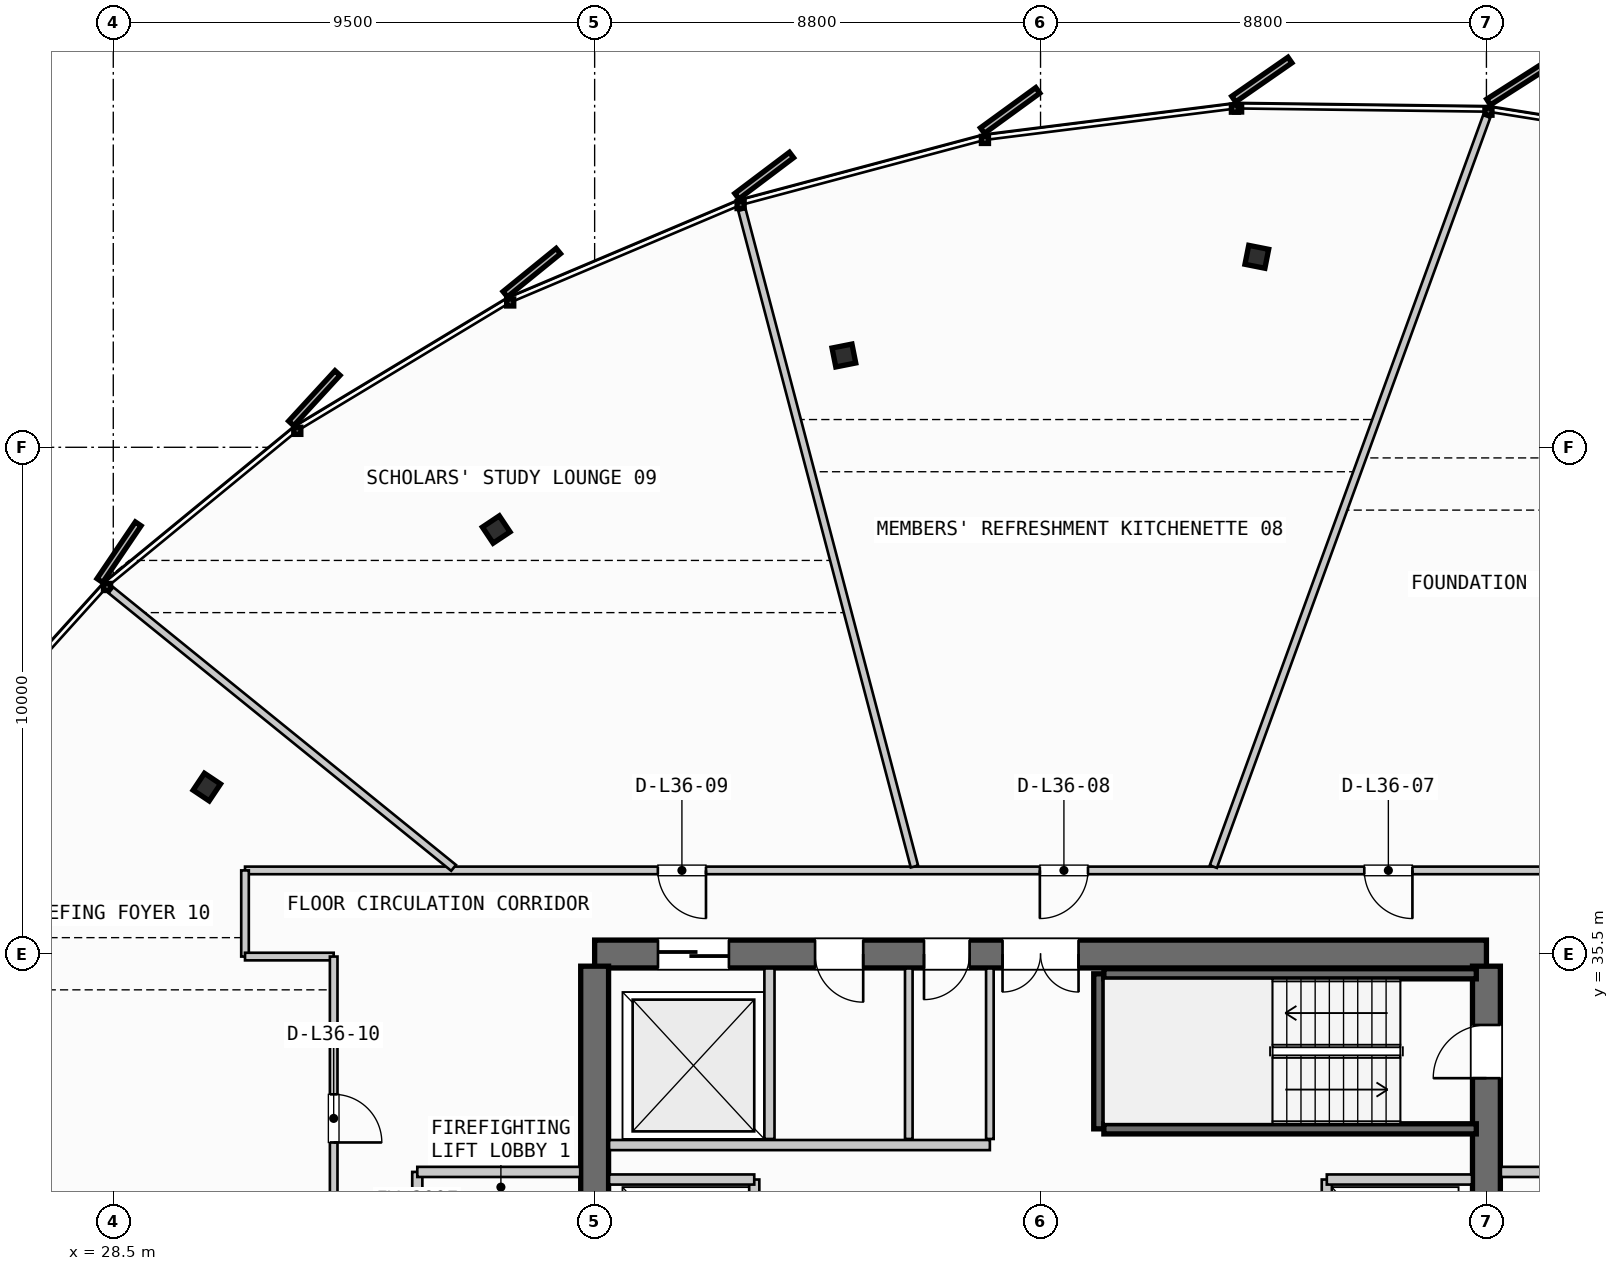
"""IFC4 building model, lengths in metres.
Left out: names, types, materials, properties, quantities, classifications, styles, units other than length and angle.
Written with IfcOpenShell. Run it as: python <this file> out.ifc"""

import sys

from ifc_helpers import new_model, si_unit, direction, frame, frame_2d, origin, origin_2d, place, context, subcontext, project, spatial, rectangle, i_section, extrude, source, transform, mapped, element, fill, save


model = new_model("IFC4")
c1 = context("Model", 3, precision=1e-05, world=origin(), true_north=direction((0.0, 1.0)))
c2 = subcontext(c1, "Body", "Model", "MODEL_VIEW")
j1 = project(units=[si_unit("LENGTHUNIT", "METRE"), si_unit("PLANEANGLEUNIT", "RADIAN")], contexts=[c1])
p1 = place(None, origin())
s1 = spatial("IfcSite", under=j1, at=p1, CompositionType="ELEMENT")
p2 = place(p1, origin())
s2 = spatial("IfcBuilding", under=s1, at=p2, CompositionType="ELEMENT")
p3 = place(p2, frame((0.0, 0.0, 143.0)))
s3 = spatial("IfcBuildingStorey", under=s2, at=p3, CompositionType="ELEMENT", Elevation=143.0)
p4 = place(p3, frame((55.6, 35.5, 0.0), z_axis=(0.0, 0.0, 1.0), x_axis=(-1.0, 0.0, 0.0)))
e1 = element("IfcWall", 1, at=p4, inside=s3, PredefinedType="SHEAR", context=c2, shape_type="SweptSolid", body=[
    extrude(rectangle(XDim=17.6, YDim=0.55, at=frame_2d((8.8, 0.0))), origin(), (0.0, 0.0, 1.0), 3.3),
])
p5 = place(p4, frame((8.05, 0.0, 0.0)))
e2 = element("IfcOpeningElement", 2, at=p5, cuts=e1, PredefinedType="OPENING", context=c2, shape_type="SweptSolid", body=[
    extrude(rectangle(XDim=1.5, YDim=2.2, at=frame_2d((0.75, 1.1))), frame((0.0, 0.285, 0.0), z_axis=(0.0, -1.0, 0.0), x_axis=(1.0, 0.0, 0.0)), (0.0, 0.0, 1.0), 0.57),
])
p6 = place(p4, frame((14.95, 0.0, 0.0)))
e3 = element("IfcOpeningElement", 3, at=p6, cuts=e1, PredefinedType="OPENING", context=c2, shape_type="SweptSolid", body=[
    extrude(rectangle(XDim=1.4, YDim=2.3, at=frame_2d((0.7, 1.15))), frame((0.0, 0.285, 0.0), z_axis=(0.0, -1.0, 0.0), x_axis=(1.0, 0.0, 0.0)), (0.0, 0.0, 1.0), 0.57),
])
p7 = place(p4, frame((12.3, 0.0, 0.0)))
e4 = element("IfcOpeningElement", 4, at=p7, cuts=e1, PredefinedType="OPENING", context=c2, shape_type="SweptSolid", body=[
    extrude(rectangle(XDim=0.95, YDim=2.15, at=frame_2d((0.475, 1.075))), frame((0.0, 0.285, 0.0), z_axis=(0.0, -1.0, 0.0), x_axis=(1.0, 0.0, 0.0)), (0.0, 0.0, 1.0), 0.57),
])
p8 = place(p4, frame((10.2, 0.0, 0.0)))
e5 = element("IfcOpeningElement", 5, at=p8, cuts=e1, PredefinedType="OPENING", context=c2, shape_type="SweptSolid", body=[
    extrude(rectangle(XDim=0.9, YDim=2.15, at=frame_2d((0.45, 1.075))), frame((0.0, 0.285, 0.0), z_axis=(0.0, -1.0, 0.0), x_axis=(1.0, 0.0, 0.0)), (0.0, 0.0, 1.0), 0.57),
])
p9 = place(p3, frame((38.0, 35.26, 0.0), z_axis=(0.0, 0.0, 1.0), x_axis=(0.0, -1.0, 0.0)))
e6 = element("IfcWall", 6, at=p9, inside=s3, PredefinedType="SHEAR", context=c2, shape_type="SweptSolid", body=[
    extrude(rectangle(XDim=14.92, YDim=0.55, at=frame_2d((7.46, 0.0))), origin(), (0.0, 0.0, 1.0), 3.3),
])
p10 = place(p9, frame((5.21, 0.0, 0.0)))
e7 = element("IfcOpeningElement", 7, at=p10, cuts=e6, PredefinedType="OPENING", context=c2, shape_type="SweptSolid", body=[
    extrude(rectangle(XDim=1.1, YDim=2.2, at=frame_2d((0.55, 1.1))), frame((0.0, 0.285, 0.0), z_axis=(0.0, -1.0, 0.0), x_axis=(1.0, 0.0, 0.0)), (0.0, 0.0, 1.0), 0.57),
])
p11 = place(p3, frame((55.6, 20.34, 0.0), z_axis=(0.0, 0.0, 1.0), x_axis=(0.0, 1.0, 0.0)))
e8 = element("IfcWall", 8, at=p11, inside=s3, PredefinedType="SHEAR", context=c2, shape_type="SweptSolid", body=[
    extrude(rectangle(XDim=14.92, YDim=0.55, at=frame_2d((7.46, 0.0))), origin(), (0.0, 0.0, 1.0), 3.3),
])
p12 = place(p11, frame((12.71, 0.0, 0.0)))
e9 = element("IfcOpeningElement", 9, at=p12, cuts=e8, PredefinedType="OPENING", context=c2, shape_type="SweptSolid", body=[
    extrude(rectangle(XDim=1.05, YDim=2.15, at=frame_2d((0.525, 1.075))), frame((0.0, 0.285, 0.0), z_axis=(0.0, -1.0, 0.0), x_axis=(1.0, 0.0, 0.0)), (0.0, 0.0, 1.0), 0.57),
])
p13 = place(p11, frame((8.61, 0.0, 0.0)))
e10 = element("IfcOpeningElement", 10, at=p13, cuts=e8, PredefinedType="OPENING", context=c2, shape_type="SweptSolid", body=[
    extrude(rectangle(XDim=1.1, YDim=2.2, at=frame_2d((0.55, 1.1))), frame((0.0, 0.285, 0.0), z_axis=(0.0, -1.0, 0.0), x_axis=(1.0, 0.0, 0.0)), (0.0, 0.0, 1.0), 0.57),
])
m1 = source(origin(), c2, "Body", "SweptSolid", [
    extrude(i_section(OverallWidth=0.401, OverallDepth=0.381, WebThickness=0.032, FlangeThickness=0.051, FilletRadius=0.015, at=origin_2d()), origin(), (0.0, 0.0, 1.0), 3.3),
])
for number, where, z_axis, x_axis in (
    (11, (51.069, 49.259, 0.0), (0.0, 0.0, 1.0), (0.195, 0.981, 0.0)),
    (12, (42.919, 47.311, 0.0), (0.0, 0.0, 1.0), (-0.195, 0.981, 0.0)),
    (13, (36.058, 43.877, 0.0), (0.0, 0.0, 1.0), (-0.556, 0.831, 0.0)),
    (14, (30.346, 38.794, 0.0), (0.0, 0.0, 1.0), (-0.831, 0.556, 0.0)),
):
    element("IfcColumn", number, at=place(p3, frame(where, z_axis=z_axis, x_axis=x_axis)), inside=s3, PredefinedType="COLUMN", context=c2, shape_type="MappedRepresentation", body=[
        mapped(m1, transform((0.0, 0.0, 0.0), scale=1.0)),
    ])
p14 = place(p3, frame((47.95, 32.05, 0.0), z_axis=(0.0, 0.0, 1.0), x_axis=(0.0, 1.0, 0.0)))
e15 = element("IfcWall", 15, at=p14, inside=s3, PredefinedType="SHEAR", context=c2, shape_type="SweptSolid", body=[
    extrude(rectangle(XDim=3.06, YDim=0.2, at=frame_2d((1.53, 0.0))), origin(), (0.0, 0.0, 1.0), 3.3),
])
for number, where, z_axis, x_axis in (
    (16, (48.05, 35.11, 0.0), (0.0, 0.0, 1.0), (1.0, 0.0, 0.0)),
    (17, (55.4, 32.05, 0.0), (0.0, 0.0, 1.0), (-1.0, 0.0, 0.0)),
):
    element("IfcWall", number, at=place(p3, frame(where, z_axis=z_axis, x_axis=x_axis)), inside=s3, PredefinedType="SHEAR", context=c2, shape_type="SweptSolid", body=[
        extrude(rectangle(XDim=7.35, YDim=0.2, at=frame_2d((3.675, 0.0))), origin(), (0.0, 0.0, 1.0), 3.3),
    ])
p15 = place(p3, frame((41.15, 27.95, 0.0), z_axis=(0.0, 0.0, 1.0), x_axis=(0.0, 1.0, 0.0)))
e18 = element("IfcWall", 18, at=p15, inside=s3, PredefinedType="PARTITIONING", context=c2, shape_type="SweptSolid", body=[
    extrude(rectangle(XDim=3.1, YDim=0.2, at=frame_2d((1.55, 0.0))), origin(), (0.0, 0.0, 1.0), 2.305),
])
p16 = place(p3, frame((38.285, 31.05, 0.0), z_axis=(0.0, 0.0, 1.0), x_axis=(1.0, 0.0, 0.0)))
e19 = element("IfcWall", 19, at=p16, inside=s3, PredefinedType="PARTITIONING", context=c2, shape_type="SweptSolid", body=[
    extrude(rectangle(XDim=2.865, YDim=0.2, at=frame_2d((1.433, 0.0))), origin(), (0.0, 0.0, 1.0), 2.305),
])
p17 = place(p3, frame((34.5, 31.2, 0.0), z_axis=(0.0, 0.0, 1.0), x_axis=(0.0, -1.0, 0.0)))
e20 = element("IfcWall", 20, at=p17, inside=s3, PredefinedType="PARTITIONING", context=c2, shape_type="SweptSolid", body=[
    extrude(rectangle(XDim=4.4, YDim=0.2, at=frame_2d((2.2, 0.0))), origin(), (0.0, 0.0, 1.0), 2.305),
])
p18 = place(p17, frame((1.65, 0.0, 0.0)))
e21 = element("IfcOpeningElement", 21, at=p18, cuts=e20, PredefinedType="OPENING", context=c2, shape_type="SweptSolid", body=[
    extrude(rectangle(XDim=1.05, YDim=2.15, at=frame_2d((0.525, 1.075))), frame((0.0, 0.11, 0.0), z_axis=(0.0, -1.0, 0.0), x_axis=(1.0, 0.0, 0.0)), (0.0, 0.0, 1.0), 0.22),
])
p19 = place(p3, frame((34.5, 31.2, 0.0), z_axis=(0.0, 0.0, 1.0), x_axis=(1.0, 0.0, 0.0)))
e22 = element("IfcWall", 22, at=p19, inside=s3, PredefinedType="PARTITIONING", context=c2, shape_type="SweptSolid", body=[
    extrude(rectangle(XDim=3.215, YDim=0.2, at=frame_2d((1.607, 0.0))), origin(), (0.0, 0.0, 1.0), 2.305),
])
p20 = place(p3, frame((52.45, 27.95, 0.0), z_axis=(0.0, 0.0, 1.0), x_axis=(0.0, 1.0, 0.0)))
e23 = element("IfcWall", 23, at=p20, inside=s3, PredefinedType="PARTITIONING", context=c2, shape_type="SweptSolid", body=[
    extrude(rectangle(XDim=3.1, YDim=0.2, at=frame_2d((1.55, 0.0))), origin(), (0.0, 0.0, 1.0), 2.305),
])
p21 = place(p3, frame((52.45, 31.05, 0.0), z_axis=(0.0, 0.0, 1.0), x_axis=(1.0, 0.0, 0.0)))
e24 = element("IfcWall", 24, at=p21, inside=s3, PredefinedType="PARTITIONING", context=c2, shape_type="SweptSolid", body=[
    extrude(rectangle(XDim=2.865, YDim=0.2, at=frame_2d((1.433, 0.0))), origin(), (0.0, 0.0, 1.0), 2.305),
])
p22 = place(p3, frame((55.885, 31.2, 0.0), z_axis=(0.0, 0.0, 1.0), x_axis=(1.0, 0.0, 0.0)))
e25 = element("IfcWall", 25, at=p22, inside=s3, PredefinedType="PARTITIONING", context=c2, shape_type="SweptSolid", body=[
    extrude(rectangle(XDim=3.215, YDim=0.2, at=frame_2d((1.607, 0.0))), origin(), (0.0, 0.0, 1.0), 2.305),
])
p23 = place(p3, frame((41.45, 31.85, 0.0), z_axis=(0.0, 0.0, 1.0), x_axis=(0.0, 1.0, 0.0)))
e26 = element("IfcWall", 26, at=p23, inside=s3, PredefinedType="PARTITIONING", context=c2, shape_type="SweptSolid", body=[
    extrude(rectangle(XDim=3.365, YDim=0.2, at=frame_2d((1.683, 0.0))), origin(), (0.0, 0.0, 1.0), 2.305),
])
p24 = place(p3, frame((38.285, 31.73, 0.0), z_axis=(0.0, 0.0, 1.0), x_axis=(1.0, 0.0, 0.0)))
e27 = element("IfcWall", 27, at=p24, inside=s3, PredefinedType="PARTITIONING", context=c2, shape_type="SweptSolid", body=[
    extrude(rectangle(XDim=7.515, YDim=0.2, at=frame_2d((3.758, 0.0))), origin(), (0.0, 0.0, 1.0), 2.305),
])
p25 = place(p3, frame((45.8, 31.85, 0.0), z_axis=(0.0, 0.0, 1.0), x_axis=(0.0, 1.0, 0.0)))
e28 = element("IfcWall", 28, at=p25, inside=s3, PredefinedType="PARTITIONING", context=c2, shape_type="SweptSolid", body=[
    extrude(rectangle(XDim=3.365, YDim=0.15, at=frame_2d((1.683, 0.0))), origin(), (0.0, 0.0, 1.0), 2.305),
])
p26 = place(p3, frame((44.2, 31.85, 0.0), z_axis=(0.0, 0.0, 1.0), x_axis=(0.0, 1.0, 0.0)))
e29 = element("IfcWall", 29, at=p26, inside=s3, PredefinedType="PLUMBINGWALL", context=c2, shape_type="SweptSolid", body=[
    extrude(rectangle(XDim=3.365, YDim=0.15, at=frame_2d((1.683, 0.0))), origin(), (0.0, 0.0, 1.0), 2.305),
])
p27 = place(p3, frame((62.5, 37.15, 0.0), z_axis=(0.0, 0.0, 1.0), x_axis=(-1.0, 0.0, 0.0)))
e30 = element("IfcWall", 30, at=p27, inside=s3, PredefinedType="PARTITIONING", context=c2, shape_type="SweptSolid", body=[
    extrude(rectangle(XDim=31.4, YDim=0.15, at=frame_2d((15.7, 0.0))), origin(), (0.0, 0.0, 1.0), 2.305),
])
p28 = place(p27, frame((2.56, 0.0, 0.0)))
e31 = element("IfcOpeningElement", 31, at=p28, cuts=e30, PredefinedType="OPENING", context=c2, shape_type="SweptSolid", body=[
    extrude(rectangle(XDim=0.95, YDim=2.15, at=frame_2d((0.475, 1.075))), frame((0.0, 0.085, 0.0), z_axis=(0.0, -1.0, 0.0), x_axis=(1.0, 0.0, 0.0)), (0.0, 0.0, 1.0), 0.17),
])
p29 = place(p27, frame((8.361, 0.0, 0.0)))
e32 = element("IfcOpeningElement", 32, at=p29, cuts=e30, PredefinedType="OPENING", context=c2, shape_type="SweptSolid", body=[
    extrude(rectangle(XDim=0.95, YDim=2.15, at=frame_2d((0.475, 1.075))), frame((0.0, 0.085, 0.0), z_axis=(0.0, -1.0, 0.0), x_axis=(1.0, 0.0, 0.0)), (0.0, 0.0, 1.0), 0.17),
])
p30 = place(p27, frame((14.763, 0.0, 0.0)))
e33 = element("IfcOpeningElement", 33, at=p30, cuts=e30, PredefinedType="OPENING", context=c2, shape_type="SweptSolid", body=[
    extrude(rectangle(XDim=0.95, YDim=2.15, at=frame_2d((0.475, 1.075))), frame((0.0, 0.085, 0.0), z_axis=(0.0, -1.0, 0.0), x_axis=(1.0, 0.0, 0.0)), (0.0, 0.0, 1.0), 0.17),
])
p31 = place(p27, frame((22.302, 0.0, 0.0)))
e34 = element("IfcOpeningElement", 34, at=p31, cuts=e30, PredefinedType="OPENING", context=c2, shape_type="SweptSolid", body=[
    extrude(rectangle(XDim=0.95, YDim=2.15, at=frame_2d((0.475, 1.075))), frame((0.0, 0.085, 0.0), z_axis=(0.0, -1.0, 0.0), x_axis=(1.0, 0.0, 0.0)), (0.0, 0.0, 1.0), 0.17),
])
p32 = place(p3, frame((31.1, 37.15, 0.0), z_axis=(0.0, 0.0, 1.0), x_axis=(0.0, -1.0, 0.0)))
e35 = element("IfcWall", 35, at=p32, inside=s3, PredefinedType="PARTITIONING", context=c2, shape_type="SweptSolid", body=[
    extrude(rectangle(XDim=1.7, YDim=0.15, at=frame_2d((0.85, 0.0))), origin(), (0.0, 0.0, 1.0), 2.305),
])
p33 = place(p3, frame((31.1, 35.45, 0.0), z_axis=(0.0, 0.0, 1.0), x_axis=(1.0, 0.0, 0.0)))
e36 = element("IfcWall", 36, at=p33, inside=s3, PredefinedType="PARTITIONING", context=c2, shape_type="SweptSolid", body=[
    extrude(rectangle(XDim=1.75, YDim=0.15, at=frame_2d((0.875, 0.0))), origin(), (0.0, 0.0, 1.0), 2.305),
])
p34 = place(p3, frame((32.85, 35.45, 0.0), z_axis=(0.0, 0.0, 1.0), x_axis=(0.0, -1.0, 0.0)))
e37 = element("IfcWall", 37, at=p34, inside=s3, PredefinedType="PARTITIONING", context=c2, shape_type="SweptSolid", body=[
    extrude(rectangle(XDim=15.3, YDim=0.15, at=frame_2d((7.65, 0.0))), origin(), (0.0, 0.0, 1.0), 2.305),
])
p35 = place(p34, frame((2.719, 0.0, 0.0)))
e38 = element("IfcOpeningElement", 38, at=p35, cuts=e37, PredefinedType="OPENING", context=c2, shape_type="SweptSolid", body=[
    extrude(rectangle(XDim=0.95, YDim=2.15, at=frame_2d((0.475, 1.075))), frame((0.0, 0.085, 0.0), z_axis=(0.0, -1.0, 0.0), x_axis=(1.0, 0.0, 0.0)), (0.0, 0.0, 1.0), 0.17),
])
p36 = place(p34, frame((9.788, 0.0, 0.0)))
e39 = element("IfcOpeningElement", 39, at=p36, cuts=e37, PredefinedType="OPENING", context=c2, shape_type="SweptSolid", body=[
    extrude(rectangle(XDim=0.95, YDim=2.15, at=frame_2d((0.475, 1.075))), frame((0.0, 0.085, 0.0), z_axis=(0.0, -1.0, 0.0), x_axis=(1.0, 0.0, 0.0)), (0.0, 0.0, 1.0), 0.17),
])
p37 = place(p3, frame((50.211, 37.225, 0.0), z_axis=(0.0, 0.0, 1.0), x_axis=(0.342383690123, 0.939560220921, 0.0)))
e40 = element("IfcWall", 40, at=p37, inside=s3, PredefinedType="PARTITIONING", context=c2, shape_type="SweptSolid", body=[
    extrude(rectangle(XDim=15.757, YDim=0.15, at=frame_2d((7.878, 0.0))), origin(), (0.0, 0.0, 1.0), 2.305),
])
p38 = place(p3, frame((44.311, 37.227, 0.0), z_axis=(0.0, 0.0, 1.0), x_axis=(-0.254138945529, 0.96716771884, 0.0)))
e41 = element("IfcWall", 41, at=p38, inside=s3, PredefinedType="PARTITIONING", context=c2, shape_type="SweptSolid", body=[
    extrude(rectangle(XDim=13.396, YDim=0.15, at=frame_2d((6.698, 0.0))), origin(), (0.0, 0.0, 1.0), 2.305),
])
p39 = place(p3, frame((35.216, 37.2, 0.0), z_axis=(0.0, 0.0, 1.0), x_axis=(-0.776920762639, 0.629598386736, 0.0)))
e42 = element("IfcWall", 42, at=p39, inside=s3, PredefinedType="PARTITIONING", context=c2, shape_type="SweptSolid", body=[
    extrude(rectangle(XDim=8.704, YDim=0.15, at=frame_2d((4.352, 0.0))), origin(), (0.0, 0.0, 1.0), 2.305),
])
p40 = place(p3, frame((32.771, 29.653, 0.0), z_axis=(0.0, 0.0, 1.0), x_axis=(-0.991514028733, 0.129999733947, 0.0)))
e43 = element("IfcWall", 43, at=p40, inside=s3, PredefinedType="PARTITIONING", context=c2, shape_type="SweptSolid", body=[
    extrude(rectangle(XDim=11.929, YDim=0.15, at=frame_2d((5.965, 0.0))), origin(), (0.0, 0.0, 1.0), 2.305),
])
m2 = source(origin(), c2, "Body", "SweptSolid", [
    extrude(rectangle(XDim=1.05, YDim=2.15, at=frame_2d((0.525, 1.075))), frame((0.0, 0.025, 0.0), z_axis=(0.0, -1.0, 0.0), x_axis=(1.0, 0.0, 0.0)), (0.0, 0.0, 1.0), 0.05),
])
p41 = place(p12, origin())
e44 = element("IfcDoor", 44, at=p41, inside=s3, OperationType="SINGLE_SWING_LEFT", PredefinedType="DOOR", context=c2, shape_type="MappedRepresentation", body=[
    mapped(m2, transform((0.0, 0.0, 0.0), scale=1.0)),
])
fill(e9, e44)
m3 = source(origin(), c2, "Body", "SweptSolid", [
    extrude(rectangle(XDim=1.5, YDim=2.2, at=frame_2d((0.75, 1.1))), frame((0.0, 0.025, 0.0), z_axis=(0.0, -1.0, 0.0), x_axis=(1.0, 0.0, 0.0)), (0.0, 0.0, 1.0), 0.05),
])
p42 = place(p5, origin())
e45 = element("IfcDoor", 45, at=p42, inside=s3, OperationType="DOUBLE_DOOR_SINGLE_SWING", PredefinedType="DOOR", context=c2, shape_type="MappedRepresentation", body=[
    mapped(m3, transform((0.0, 0.0, 0.0), scale=1.0)),
])
fill(e2, e45)
m4 = source(origin(), c2, "Body", "SweptSolid", [
    extrude(rectangle(XDim=1.4, YDim=2.3, at=frame_2d((0.7, 1.15))), frame((0.0, 0.025, 0.0), z_axis=(0.0, -1.0, 0.0), x_axis=(1.0, 0.0, 0.0)), (0.0, 0.0, 1.0), 0.05),
])
p43 = place(p6, origin())
e46 = element("IfcDoor", 46, at=p43, inside=s3, OperationType="SLIDING_TO_RIGHT", PredefinedType="DOOR", context=c2, shape_type="MappedRepresentation", body=[
    mapped(m4, transform((0.0, 0.0, 0.0), scale=1.0)),
])
fill(e3, e46)
m5 = source(origin(), c2, "Body", "SweptSolid", [
    extrude(rectangle(XDim=0.95, YDim=2.15, at=frame_2d((0.475, 1.075))), frame((0.0, 0.025, 0.0), z_axis=(0.0, -1.0, 0.0), x_axis=(1.0, 0.0, 0.0)), (0.0, 0.0, 1.0), 0.05),
])
p44 = place(p7, origin())
e47 = element("IfcDoor", 47, at=p44, inside=s3, OperationType="SINGLE_SWING_LEFT", PredefinedType="DOOR", context=c2, shape_type="MappedRepresentation", body=[
    mapped(m5, transform((0.0, 0.0, 0.0), scale=1.0)),
])
fill(e4, e47)
m6 = source(origin(), c2, "Body", "SweptSolid", [
    extrude(rectangle(XDim=0.9, YDim=2.15, at=frame_2d((0.45, 1.075))), frame((0.0, 0.025, 0.0), z_axis=(0.0, -1.0, 0.0), x_axis=(1.0, 0.0, 0.0)), (0.0, 0.0, 1.0), 0.05),
])
p45 = place(p8, origin())
e48 = element("IfcDoor", 48, at=p45, inside=s3, OperationType="SINGLE_SWING_RIGHT", PredefinedType="DOOR", context=c2, shape_type="MappedRepresentation", body=[
    mapped(m6, transform((0.0, 0.0, 0.0), scale=1.0)),
])
fill(e5, e48)
p46 = place(p29, origin())
e49 = element("IfcDoor", 49, at=p46, inside=s3, OperationType="SINGLE_SWING_LEFT", PredefinedType="DOOR", context=c2, shape_type="MappedRepresentation", body=[
    mapped(m5, transform((0.0, 0.0, 0.0), scale=1.0)),
])
fill(e32, e49)
p47 = place(p30, origin())
e50 = element("IfcDoor", 50, at=p47, inside=s3, OperationType="SINGLE_SWING_RIGHT", PredefinedType="DOOR", context=c2, shape_type="MappedRepresentation", body=[
    mapped(m5, transform((0.0, 0.0, 0.0), scale=1.0)),
])
fill(e33, e50)
p48 = place(p31, origin())
e51 = element("IfcDoor", 51, at=p48, inside=s3, OperationType="SINGLE_SWING_LEFT", PredefinedType="DOOR", context=c2, shape_type="MappedRepresentation", body=[
    mapped(m5, transform((0.0, 0.0, 0.0), scale=1.0)),
])
fill(e34, e51)
p49 = place(p35, origin())
e52 = element("IfcDoor", 52, at=p49, inside=s3, OperationType="SINGLE_SWING_RIGHT", PredefinedType="DOOR", context=c2, shape_type="MappedRepresentation", body=[
    mapped(m5, transform((0.0, 0.0, 0.0), scale=1.0)),
])
fill(e38, e52)
save(model, sys.argv[1])
